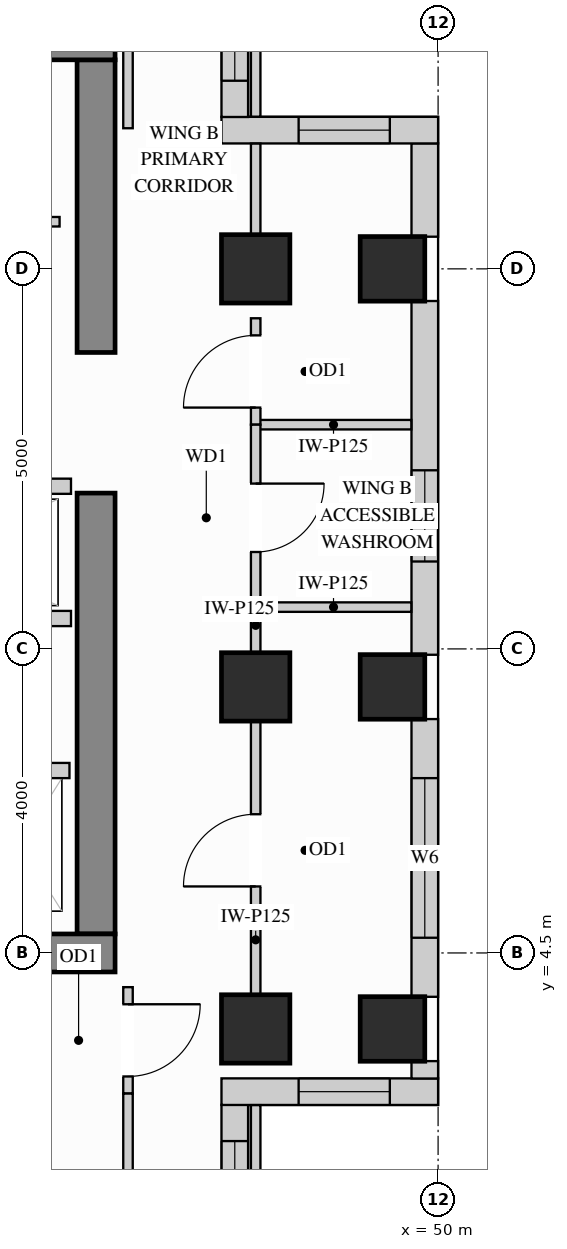
"""IFC4 building model, lengths in metres.
Left out: names, types, materials, properties, quantities, classifications, styles, units other than length and angle.
Written with IfcOpenShell. Run it as: python <this file> out.ifc"""

import sys

from ifc_helpers import new_model, si_unit, direction, frame, frame_2d, origin, origin_2d, place, context, subcontext, project, spatial, rectangle, extrude, source, transform, mapped, element, fill, save


model = new_model("IFC4")
c1 = context("Model", 3, precision=1e-05, world=origin(), true_north=direction((0.0, 1.0)))
c2 = subcontext(c1, "Body", "Model", "MODEL_VIEW")
j1 = project(units=[si_unit("LENGTHUNIT", "METRE"), si_unit("PLANEANGLEUNIT", "RADIAN")], contexts=[c1])
p1 = place(None, origin())
s1 = spatial("IfcSite", under=j1, at=p1, CompositionType="ELEMENT")
p2 = place(p1, origin())
s2 = spatial("IfcBuilding", under=s1, at=p2, CompositionType="ELEMENT")
p3 = place(p2, frame((0.0, 0.0, 241.2)))
s3 = spatial("IfcBuildingStorey", under=s2, at=p3, CompositionType="ELEMENT", Elevation=241.2)
m1 = source(origin(), c2, "Body", "SweptSolid", [
    extrude(rectangle(XDim=0.9, YDim=0.9, at=origin_2d()), origin(), (0.0, 0.0, 1.0), 3.4),
])
for number, where, z_axis, x_axis in (
    (1, (47.6, 13.5, 0.0), (0.0, 0.0, 1.0), (1.0, 0.0, 0.0)),
    (2, (47.6, 3.5, 0.0), (0.0, 0.0, 1.0), (1.0, 0.0, 0.0)),
    (3, (47.6, 8.0, 0.0), (0.0, 0.0, 1.0), (1.0, 0.0, 0.0)),
):
    element("IfcColumn", number, at=place(p3, frame(where, z_axis=z_axis, x_axis=x_axis)), inside=s3, PredefinedType="COLUMN", context=c2, shape_type="MappedRepresentation", body=[
        mapped(m1, transform((0.0, 0.0, 0.0), x_axis=(1.0, 0.0, 0.0), y_axis=(0.0, 1.0, 0.0), z_axis=(0.0, 0.0, 1.0))),
    ])
m2 = source(origin(), c2, "Body", "SweptSolid", [
    extrude(rectangle(XDim=0.85, YDim=0.85, at=origin_2d()), origin(), (0.0, 0.0, 1.0), 3.4),
])
for number, where, z_axis, x_axis in (
    (4, (49.4, 13.5, 0.0), (0.0, 0.0, 1.0), (1.0, 0.0, 0.0)),
    (5, (49.4, 3.5, 0.0), (0.0, 0.0, 1.0), (1.0, 0.0, 0.0)),
    (6, (49.4, 8.0, 0.0), (0.0, 0.0, 1.0), (1.0, 0.0, 0.0)),
):
    element("IfcColumn", number, at=place(p3, frame(where, z_axis=z_axis, x_axis=x_axis)), inside=s3, PredefinedType="COLUMN", context=c2, shape_type="MappedRepresentation", body=[
        mapped(m2, transform((0.0, 0.0, 0.0), x_axis=(1.0, 0.0, 0.0), y_axis=(0.0, 1.0, 0.0), z_axis=(0.0, 0.0, 1.0))),
    ])
m3 = source(origin(), c2, "Body", "SweptSolid", [
    extrude(rectangle(XDim=5.8, YDim=0.5, at=frame_2d((2.9, 0.0))), origin(), (0.0, 0.0, 1.0), 3.4),
])
p4 = place(p3, frame((45.5, 4.75, 0.0), z_axis=(0.0, 0.0, 1.0), x_axis=(0.0, 1.0, 0.0)))
e7 = element("IfcWall", 7, at=p4, inside=s3, PredefinedType="SHEAR", context=c2, shape_type="MappedRepresentation", body=[
    mapped(m3, transform((0.0, 0.0, 0.0), x_axis=(1.0, 0.0, 0.0), y_axis=(0.0, 1.0, 0.0), z_axis=(0.0, 0.0, 1.0))),
])
m4 = source(origin(), c2, "Body", "SweptSolid", [
    extrude(rectangle(XDim=3.85, YDim=0.5, at=frame_2d((1.925, 0.0))), origin(), (0.0, 0.0, 1.0), 3.4),
])
p5 = place(p3, frame((45.5, 12.4, 0.0), z_axis=(0.0, 0.0, 1.0), x_axis=(0.0, 1.0, 0.0)))
e8 = element("IfcWall", 8, at=p5, inside=s3, PredefinedType="SHEAR", context=c2, shape_type="MappedRepresentation", body=[
    mapped(m4, transform((0.0, 0.0, 0.0), x_axis=(1.0, 0.0, 0.0), y_axis=(0.0, 1.0, 0.0), z_axis=(0.0, 0.0, 1.0))),
])
m5 = source(origin(), c2, "Body", "SweptSolid", [
    extrude(rectangle(XDim=10.0, YDim=0.5, at=frame_2d((5.0, 0.0))), origin(), (0.0, 0.0, 1.0), 3.4),
])
for number, where, z_axis, x_axis in (
    (9, (35.75, 16.5, 0.0), (0.0, 0.0, 1.0), (1.0, 0.0, 0.0)),
    (10, (35.75, 4.5, 0.0), (0.0, 0.0, 1.0), (1.0, 0.0, 0.0)),
):
    element("IfcWall", number, at=place(p3, frame(where, z_axis=z_axis, x_axis=x_axis)), inside=s3, PredefinedType="SHEAR", context=c2, shape_type="MappedRepresentation", body=[
        mapped(m5, transform((0.0, 0.0, 0.0), x_axis=(1.0, 0.0, 0.0), y_axis=(0.0, 1.0, 0.0), z_axis=(0.0, 0.0, 1.0))),
    ])
p6 = place(p3, frame((47.325, 0.348, 0.0), z_axis=(0.0, 0.0, 1.0), x_axis=(0.0, 1.0, 0.0)))
e11 = element("IfcWall", 11, at=p6, inside=s3, PredefinedType="SOLIDWALL", context=c2, shape_type="SweptSolid", body=[
    extrude(rectangle(XDim=2.154, YDim=0.35, at=frame_2d((1.077, 0.0))), origin(), (0.0, 0.0, 1.0), 3.385),
])
p7 = place(p6, frame((0.477, 0.0, 0.78)))
e12 = element("IfcOpeningElement", 12, at=p7, cuts=e11, PredefinedType="OPENING", context=c2, shape_type="SweptSolid", body=[
    extrude(rectangle(XDim=1.2, YDim=2.25, at=frame_2d((0.6, 1.125))), frame((0.0, 0.185, 0.0), z_axis=(0.0, -1.0, 0.0), x_axis=(1.0, 0.0, 0.0)), (0.0, 0.0, 1.0), 0.37),
])
p8 = place(p3, frame((47.15, 2.675, 0.0), z_axis=(0.0, 0.0, 1.0), x_axis=(1.0, 0.0, 0.0)))
e13 = element("IfcWall", 13, at=p8, inside=s3, PredefinedType="SOLIDWALL", context=c2, shape_type="SweptSolid", body=[
    extrude(rectangle(XDim=2.85, YDim=0.35, at=frame_2d((1.425, 0.0))), origin(), (0.0, 0.0, 1.0), 3.385),
])
p9 = place(p8, frame((1.015, 0.0, 0.78)))
e14 = element("IfcOpeningElement", 14, at=p9, cuts=e13, PredefinedType="OPENING", context=c2, shape_type="SweptSolid", body=[
    extrude(rectangle(XDim=1.2, YDim=2.25, at=frame_2d((0.6, 1.125))), frame((0.0, 0.185, 0.0), z_axis=(0.0, -1.0, 0.0), x_axis=(1.0, 0.0, 0.0)), (0.0, 0.0, 1.0), 0.37),
])
m6 = source(origin(), c2, "Body", "SweptSolid", [
    extrude(rectangle(XDim=0.229, YDim=0.35, at=frame_2d((0.115, 0.0))), origin(), (0.0, 0.0, 1.0), 3.385),
])
p10 = place(p3, frame((49.825, 2.848, 0.0), z_axis=(0.0, 0.0, 1.0), x_axis=(0.0, 1.0, 0.0)))
e15 = element("IfcWall", 15, at=p10, inside=s3, PredefinedType="SOLIDWALL", context=c2, shape_type="MappedRepresentation", body=[
    mapped(m6, transform((0.0, 0.0, 0.0), x_axis=(1.0, 0.0, 0.0), y_axis=(0.0, 1.0, 0.0), z_axis=(0.0, 0.0, 1.0))),
])
p11 = place(p3, frame((49.825, 3.923, 0.0), z_axis=(0.0, 0.0, 1.0), x_axis=(0.0, 1.0, 0.0)))
e16 = element("IfcWall", 16, at=p11, inside=s3, PredefinedType="SOLIDWALL", context=c2, shape_type="SweptSolid", body=[
    extrude(rectangle(XDim=3.654, YDim=0.35, at=frame_2d((1.827, 0.0))), origin(), (0.0, 0.0, 1.0), 3.385),
])
p12 = place(p11, frame((0.777, 0.0, 0.78)))
e17 = element("IfcOpeningElement", 17, at=p12, cuts=e16, PredefinedType="OPENING", context=c2, shape_type="SweptSolid", body=[
    extrude(rectangle(XDim=2.1, YDim=2.25, at=frame_2d((1.05, 1.125))), frame((0.0, 0.185, 0.0), z_axis=(0.0, -1.0, 0.0), x_axis=(1.0, 0.0, 0.0)), (0.0, 0.0, 1.0), 0.37),
])
p13 = place(p3, frame((49.825, 8.423, 0.0), z_axis=(0.0, 0.0, 1.0), x_axis=(0.0, 1.0, 0.0)))
e18 = element("IfcWall", 18, at=p13, inside=s3, PredefinedType="SOLIDWALL", context=c2, shape_type="SweptSolid", body=[
    extrude(rectangle(XDim=4.654, YDim=0.35, at=frame_2d((2.327, 0.0))), origin(), (0.0, 0.0, 1.0), 3.385),
])
p14 = place(p13, frame((1.227, 0.0, 0.78)))
e19 = element("IfcOpeningElement", 19, at=p14, cuts=e18, PredefinedType="OPENING", context=c2, shape_type="SweptSolid", body=[
    extrude(rectangle(XDim=1.2, YDim=2.25, at=frame_2d((0.6, 1.125))), frame((0.0, 0.185, 0.0), z_axis=(0.0, -1.0, 0.0), x_axis=(1.0, 0.0, 0.0)), (0.0, 0.0, 1.0), 0.37),
])
m7 = source(origin(), c2, "Body", "SweptSolid", [
    extrude(rectangle(XDim=1.229, YDim=0.35, at=frame_2d((0.615, 0.0))), origin(), (0.0, 0.0, 1.0), 3.385),
])
p15 = place(p3, frame((49.825, 13.923, 0.0), z_axis=(0.0, 0.0, 1.0), x_axis=(0.0, 1.0, 0.0)))
e20 = element("IfcWall", 20, at=p15, inside=s3, PredefinedType="SOLIDWALL", context=c2, shape_type="MappedRepresentation", body=[
    mapped(m7, transform((0.0, 0.0, 0.0), x_axis=(1.0, 0.0, 0.0), y_axis=(0.0, 1.0, 0.0), z_axis=(0.0, 0.0, 1.0))),
])
p16 = place(p3, frame((50.0, 15.325, 0.0), z_axis=(0.0, 0.0, 1.0), x_axis=(-1.0, 0.0, 0.0)))
e21 = element("IfcWall", 21, at=p16, inside=s3, PredefinedType="SOLIDWALL", context=c2, shape_type="SweptSolid", body=[
    extrude(rectangle(XDim=2.85, YDim=0.35, at=frame_2d((1.425, 0.0))), origin(), (0.0, 0.0, 1.0), 3.385),
])
p17 = place(p16, frame((0.635, 0.0, 0.78)))
e22 = element("IfcOpeningElement", 22, at=p17, cuts=e21, PredefinedType="OPENING", context=c2, shape_type="SweptSolid", body=[
    extrude(rectangle(XDim=1.2, YDim=2.25, at=frame_2d((0.6, 1.125))), frame((0.0, 0.185, 0.0), z_axis=(0.0, -1.0, 0.0), x_axis=(1.0, 0.0, 0.0)), (0.0, 0.0, 1.0), 0.37),
])
p18 = place(p3, frame((47.325, 15.498, 0.0), z_axis=(0.0, 0.0, 1.0), x_axis=(0.0, 1.0, 0.0)))
e23 = element("IfcWall", 23, at=p18, inside=s3, PredefinedType="SOLIDWALL", context=c2, shape_type="SweptSolid", body=[
    extrude(rectangle(XDim=2.154, YDim=0.35, at=frame_2d((1.077, 0.0))), origin(), (0.0, 0.0, 1.0), 3.385),
])
p19 = place(p18, frame((0.477, 0.0, 0.78)))
e24 = element("IfcOpeningElement", 24, at=p19, cuts=e23, PredefinedType="OPENING", context=c2, shape_type="SweptSolid", body=[
    extrude(rectangle(XDim=1.2, YDim=2.25, at=frame_2d((0.6, 1.125))), frame((0.0, 0.185, 0.0), z_axis=(0.0, -1.0, 0.0), x_axis=(1.0, 0.0, 0.0)), (0.0, 0.0, 1.0), 0.37),
])
p20 = place(p3, frame((41.8, 14.12, 0.0), z_axis=(0.0, 0.0, 1.0), x_axis=(1.0, 0.0, 0.0)))
e25 = element("IfcWall", 25, at=p20, inside=s3, PredefinedType="PARTITIONING", context=c2, shape_type="SweptSolid", body=[
    extrude(rectangle(XDim=3.22, YDim=0.125, at=frame_2d((1.61, 0.0))), origin(), (0.0, 0.0, 1.0), 3.385),
])
p21 = place(p20, frame((1.135, 0.0, 0.0)))
e26 = element("IfcOpeningElement", 26, at=p21, cuts=e25, PredefinedType="OPENING", context=c2, shape_type="SweptSolid", body=[
    extrude(rectangle(XDim=0.85, YDim=2.1, at=frame_2d((0.425, 1.05))), frame((0.0, 0.073, 0.0), z_axis=(0.0, -1.0, 0.0), x_axis=(1.0, 0.0, 0.0)), (0.0, 0.0, 1.0), 0.145),
])
m8 = source(origin(), c2, "Body", "SweptSolid", [
    extrude(rectangle(XDim=2.048, YDim=0.125, at=frame_2d((1.024, 0.0))), origin(), (0.0, 0.0, 1.0), 3.385),
])
for number, where, z_axis, x_axis in (
    (27, (47.6, 11.45, 0.0), (0.0, 0.0, 1.0), (1.0, 0.0, 0.0)),
    (28, (47.6, 9.05, 0.0), (0.0, 0.0, 1.0), (1.0, 0.0, 0.0)),
):
    element("IfcWall", number, at=place(p3, frame(where, z_axis=z_axis, x_axis=x_axis)), inside=s3, PredefinedType="PARTITIONING", context=c2, shape_type="MappedRepresentation", body=[
        mapped(m8, transform((0.0, 0.0, 0.0), x_axis=(1.0, 0.0, 0.0), y_axis=(0.0, 1.0, 0.0), z_axis=(0.0, 0.0, 1.0))),
    ])
p22 = place(p3, frame((47.6, 3.95, 0.0), z_axis=(0.0, 0.0, 1.0), x_axis=(0.0, 1.0, 0.0)))
e29 = element("IfcWall", 29, at=p22, inside=s3, PredefinedType="PARTITIONING", context=c2, shape_type="SweptSolid", body=[
    extrude(rectangle(XDim=3.6, YDim=0.125, at=frame_2d((1.8, 0.0))), origin(), (0.0, 0.0, 1.0), 2.773),
])
p23 = place(p22, frame((1.425, 0.0, 0.0)))
e30 = element("IfcOpeningElement", 30, at=p23, cuts=e29, PredefinedType="OPENING", context=c2, shape_type="SweptSolid", body=[
    extrude(rectangle(XDim=0.95, YDim=2.15, at=frame_2d((0.475, 1.075))), frame((0.0, 0.073, 0.0), z_axis=(0.0, -1.0, 0.0), x_axis=(1.0, 0.0, 0.0)), (0.0, 0.0, 1.0), 0.145),
])
m9 = source(origin(), c2, "Body", "SweptSolid", [
    extrude(rectangle(XDim=0.6, YDim=0.125, at=frame_2d((0.3, 0.0))), origin(), (0.0, 0.0, 1.0), 2.773),
])
p24 = place(p3, frame((47.6, 8.45, 0.0), z_axis=(0.0, 0.0, 1.0), x_axis=(0.0, 1.0, 0.0)))
e31 = element("IfcWall", 31, at=p24, inside=s3, PredefinedType="PARTITIONING", context=c2, shape_type="MappedRepresentation", body=[
    mapped(m9, transform((0.0, 0.0, 0.0), x_axis=(1.0, 0.0, 0.0), y_axis=(0.0, 1.0, 0.0), z_axis=(0.0, 0.0, 1.0))),
])
m10 = source(origin(), c2, "Body", "SweptSolid", [
    extrude(rectangle(XDim=2.148, YDim=0.125, at=frame_2d((1.074, 0.0))), origin(), (0.0, 0.0, 1.0), 3.385),
])
p25 = place(p3, frame((47.6, 0.35, 0.0), z_axis=(0.0, 0.0, 1.0), x_axis=(0.0, 1.0, 0.0)))
e32 = element("IfcWall", 32, at=p25, inside=s3, PredefinedType="PARTITIONING", context=c2, shape_type="MappedRepresentation", body=[
    mapped(m10, transform((0.0, 0.0, 0.0), x_axis=(1.0, 0.0, 0.0), y_axis=(0.0, 1.0, 0.0), z_axis=(0.0, 0.0, 1.0))),
])
p26 = place(p3, frame((47.6, 11.45, 0.0), z_axis=(0.0, 0.0, 1.0), x_axis=(0.0, 1.0, 0.0)))
e33 = element("IfcWall", 33, at=p26, inside=s3, PredefinedType="PARTITIONING", context=c2, shape_type="SweptSolid", body=[
    extrude(rectangle(XDim=1.4, YDim=0.125, at=frame_2d((0.7, 0.0))), origin(), (0.0, 0.0, 1.0), 2.773),
])
p27 = place(p26, frame((0.225, 0.0, 0.0)))
e34 = element("IfcOpeningElement", 34, at=p27, cuts=e33, PredefinedType="OPENING", context=c2, shape_type="SweptSolid", body=[
    extrude(rectangle(XDim=0.95, YDim=2.15, at=frame_2d((0.475, 1.075))), frame((0.0, 0.073, 0.0), z_axis=(0.0, -1.0, 0.0), x_axis=(1.0, 0.0, 0.0)), (0.0, 0.0, 1.0), 0.145),
])
m11 = source(origin(), c2, "Body", "SweptSolid", [
    extrude(rectangle(XDim=1.198, YDim=0.125, at=frame_2d((0.599, 0.0))), origin(), (0.0, 0.0, 1.0), 3.385),
])
p28 = place(p3, frame((47.6, 13.95, 0.0), z_axis=(0.0, 0.0, 1.0), x_axis=(0.0, 1.0, 0.0)))
e35 = element("IfcWall", 35, at=p28, inside=s3, PredefinedType="PARTITIONING", context=c2, shape_type="MappedRepresentation", body=[
    mapped(m11, transform((0.0, 0.0, 0.0), x_axis=(1.0, 0.0, 0.0), y_axis=(0.0, 1.0, 0.0), z_axis=(0.0, 0.0, 1.0))),
])
p29 = place(p3, frame((47.6, 15.502, 0.0), z_axis=(0.0, 0.0, 1.0), x_axis=(0.0, 1.0, 0.0)))
e36 = element("IfcWall", 36, at=p29, inside=s3, PredefinedType="PARTITIONING", context=c2, shape_type="MappedRepresentation", body=[
    mapped(m10, transform((0.0, 0.0, 0.0), x_axis=(1.0, 0.0, 0.0), y_axis=(0.0, 1.0, 0.0), z_axis=(0.0, 0.0, 1.0))),
])
p30 = place(p3, frame((47.6, 9.05, 0.0), z_axis=(0.0, 0.0, 1.0), x_axis=(0.0, 1.0, 0.0)))
e37 = element("IfcWall", 37, at=p30, inside=s3, PredefinedType="PARTITIONING", context=c2, shape_type="SweptSolid", body=[
    extrude(rectangle(XDim=2.4, YDim=0.125, at=frame_2d((1.2, 0.0))), origin(), (0.0, 0.0, 1.0), 2.773),
])
p31 = place(p30, frame((0.725, 0.0, 0.0)))
e38 = element("IfcOpeningElement", 38, at=p31, cuts=e37, PredefinedType="OPENING", context=c2, shape_type="SweptSolid", body=[
    extrude(rectangle(XDim=0.9, YDim=2.15, at=frame_2d((0.45, 1.075))), frame((0.0, 0.073, 0.0), z_axis=(0.0, -1.0, 0.0), x_axis=(1.0, 0.0, 0.0)), (0.0, 0.0, 1.0), 0.145),
])
m12 = source(origin(), c2, "Body", "SweptSolid", [
    extrude(rectangle(XDim=2.298, YDim=0.125, at=frame_2d((1.149, 0.0))), origin(), (0.0, 0.0, 1.0), 3.385),
])
p32 = place(p3, frame((45.92, 15.35, 0.0), z_axis=(0.0, 0.0, 1.0), x_axis=(0.0, 1.0, 0.0)))
e39 = element("IfcWall", 39, at=p32, inside=s3, PredefinedType="PARTITIONING", context=c2, shape_type="MappedRepresentation", body=[
    mapped(m12, transform((0.0, 0.0, 0.0), x_axis=(1.0, 0.0, 0.0), y_axis=(0.0, 1.0, 0.0), z_axis=(0.0, 0.0, 1.0))),
])
p33 = place(p3, frame((45.92, 2.65, 0.0), z_axis=(0.0, 0.0, 1.0), x_axis=(0.0, 1.0, 0.0)))
e40 = element("IfcWall", 40, at=p33, inside=s3, PredefinedType="PARTITIONING", context=c2, shape_type="SweptSolid", body=[
    extrude(rectangle(XDim=1.4, YDim=0.125, at=frame_2d((0.7, 0.0))), origin(), (0.0, 0.0, 1.0), 3.385),
])
p34 = place(p33, frame((0.225, 0.0, 0.0)))
e41 = element("IfcOpeningElement", 41, at=p34, cuts=e40, PredefinedType="OPENING", context=c2, shape_type="SweptSolid", body=[
    extrude(rectangle(XDim=0.95, YDim=2.15, at=frame_2d((0.475, 1.075))), frame((0.0, 0.073, 0.0), z_axis=(0.0, -1.0, 0.0), x_axis=(1.0, 0.0, 0.0)), (0.0, 0.0, 1.0), 0.145),
])
p35 = place(p3, frame((45.92, 0.352, 0.0), z_axis=(0.0, 0.0, 1.0), x_axis=(0.0, 1.0, 0.0)))
e42 = element("IfcWall", 42, at=p35, inside=s3, PredefinedType="PARTITIONING", context=c2, shape_type="MappedRepresentation", body=[
    mapped(m12, transform((0.0, 0.0, 0.0), x_axis=(1.0, 0.0, 0.0), y_axis=(0.0, 1.0, 0.0), z_axis=(0.0, 0.0, 1.0))),
])
m13 = source(origin(), c2, "Body", "SweptSolid", [
    extrude(rectangle(XDim=1.3, YDim=0.2, at=frame_2d((0.65, 0.0))), origin(), (0.0, 0.0, 1.0), 3.385),
])
p36 = place(p3, frame((43.85, 6.9, 0.0), z_axis=(0.0, 0.0, 1.0), x_axis=(1.0, 0.0, 0.0)))
e43 = element("IfcWall", 43, at=p36, inside=s3, PredefinedType="PARTITIONING", context=c2, shape_type="MappedRepresentation", body=[
    mapped(m13, transform((0.0, 0.0, 0.0), x_axis=(1.0, 0.0, 0.0), y_axis=(0.0, 1.0, 0.0), z_axis=(0.0, 0.0, 1.0))),
])
m14 = source(origin(), c2, "Body", "SweptSolid", [
    extrude(rectangle(XDim=3.49, YDim=0.2, at=frame_2d((1.745, 0.0))), origin(), (0.0, 0.0, 1.0), 3.385),
])
for number, where, z_axis, x_axis in (
    (44, (41.68, 10.64, 0.0), (0.0, 0.0, 1.0), (1.0, 0.0, 0.0)),
    (45, (41.68, 8.9, 0.0), (0.0, 0.0, 1.0), (1.0, 0.0, 0.0)),
):
    element("IfcWall", number, at=place(p3, frame(where, z_axis=z_axis, x_axis=x_axis)), inside=s3, PredefinedType="PARTITIONING", context=c2, shape_type="MappedRepresentation", body=[
        mapped(m14, transform((0.0, 0.0, 0.0), x_axis=(1.0, 0.0, 0.0), y_axis=(0.0, 1.0, 0.0), z_axis=(0.0, 0.0, 1.0))),
    ])
m15 = source(origin(), c2, "Body", "SweptSolid", [
    extrude(rectangle(XDim=0.95, YDim=2.15, at=frame_2d((0.475, 1.075))), frame((0.0, 0.025, 0.0), z_axis=(0.0, -1.0, 0.0), x_axis=(1.0, 0.0, 0.0)), (0.0, 0.0, 1.0), 0.05),
])
p37 = place(p34, origin())
e46 = element("IfcDoor", 46, at=p37, inside=s3, OperationType="SINGLE_SWING_RIGHT", PredefinedType="DOOR", context=c2, shape_type="MappedRepresentation", body=[
    mapped(m15, transform((0.0, 0.0, 0.0), x_axis=(1.0, 0.0, 0.0), y_axis=(0.0, 1.0, 0.0), z_axis=(0.0, 0.0, 1.0))),
])
fill(e41, e46)
p38 = place(p23, origin())
e47 = element("IfcDoor", 47, at=p38, inside=s3, OperationType="SINGLE_SWING_LEFT", PredefinedType="DOOR", context=c2, shape_type="MappedRepresentation", body=[
    mapped(m15, transform((0.0, 0.0, 0.0), x_axis=(1.0, 0.0, 0.0), y_axis=(0.0, 1.0, 0.0), z_axis=(0.0, 0.0, 1.0))),
])
fill(e30, e47)
p39 = place(p27, origin())
e48 = element("IfcDoor", 48, at=p39, inside=s3, OperationType="SINGLE_SWING_LEFT", PredefinedType="DOOR", context=c2, shape_type="MappedRepresentation", body=[
    mapped(m15, transform((0.0, 0.0, 0.0), x_axis=(1.0, 0.0, 0.0), y_axis=(0.0, 1.0, 0.0), z_axis=(0.0, 0.0, 1.0))),
])
fill(e34, e48)
m16 = source(origin(), c2, "Body", "SweptSolid", [
    extrude(rectangle(XDim=0.9, YDim=2.15, at=frame_2d((0.45, 1.075))), frame((0.0, 0.025, 0.0), z_axis=(0.0, -1.0, 0.0), x_axis=(1.0, 0.0, 0.0)), (0.0, 0.0, 1.0), 0.05),
])
p40 = place(p31, origin())
e49 = element("IfcDoor", 49, at=p40, inside=s3, OperationType="SINGLE_SWING_RIGHT", PredefinedType="DOOR", context=c2, shape_type="MappedRepresentation", body=[
    mapped(m16, transform((0.0, 0.0, 0.0), x_axis=(1.0, 0.0, 0.0), y_axis=(0.0, 1.0, 0.0), z_axis=(0.0, 0.0, 1.0))),
])
fill(e38, e49)
m17 = source(origin(), c2, "Body", "SweptSolid", [
    extrude(rectangle(XDim=1.2, YDim=2.25, at=frame_2d((0.6, 1.125))), frame((0.0, 0.03, 0.0), z_axis=(0.0, -1.0, 0.0), x_axis=(1.0, 0.0, 0.0)), (0.0, 0.0, 1.0), 0.06),
])
p41 = place(p7, origin())
e50 = element("IfcWindow", 50, at=p41, inside=s3, PartitioningType="SINGLE_PANEL", PredefinedType="WINDOW", context=c2, shape_type="MappedRepresentation", body=[
    mapped(m17, transform((0.0, 0.0, 0.0), x_axis=(1.0, 0.0, 0.0), y_axis=(0.0, 1.0, 0.0), z_axis=(0.0, 0.0, 1.0))),
])
fill(e12, e50)
p42 = place(p9, origin())
e51 = element("IfcWindow", 51, at=p42, inside=s3, PartitioningType="SINGLE_PANEL", PredefinedType="WINDOW", context=c2, shape_type="MappedRepresentation", body=[
    mapped(m17, transform((0.0, 0.0, 0.0), x_axis=(1.0, 0.0, 0.0), y_axis=(0.0, 1.0, 0.0), z_axis=(0.0, 0.0, 1.0))),
])
fill(e14, e51)
p43 = place(p14, origin())
e52 = element("IfcWindow", 52, at=p43, inside=s3, PartitioningType="SINGLE_PANEL", PredefinedType="WINDOW", context=c2, shape_type="MappedRepresentation", body=[
    mapped(m17, transform((0.0, 0.0, 0.0), x_axis=(1.0, 0.0, 0.0), y_axis=(0.0, 1.0, 0.0), z_axis=(0.0, 0.0, 1.0))),
])
fill(e19, e52)
p44 = place(p17, origin())
e53 = element("IfcWindow", 53, at=p44, inside=s3, PartitioningType="SINGLE_PANEL", PredefinedType="WINDOW", context=c2, shape_type="MappedRepresentation", body=[
    mapped(m17, transform((0.0, 0.0, 0.0), x_axis=(1.0, 0.0, 0.0), y_axis=(0.0, 1.0, 0.0), z_axis=(0.0, 0.0, 1.0))),
])
fill(e22, e53)
p45 = place(p19, origin())
e54 = element("IfcWindow", 54, at=p45, inside=s3, PartitioningType="SINGLE_PANEL", PredefinedType="WINDOW", context=c2, shape_type="MappedRepresentation", body=[
    mapped(m17, transform((0.0, 0.0, 0.0), x_axis=(1.0, 0.0, 0.0), y_axis=(0.0, 1.0, 0.0), z_axis=(0.0, 0.0, 1.0))),
])
fill(e24, e54)
m18 = source(origin(), c2, "Body", "SweptSolid", [
    extrude(rectangle(XDim=2.1, YDim=2.25, at=frame_2d((1.05, 1.125))), frame((0.0, 0.03, 0.0), z_axis=(0.0, -1.0, 0.0), x_axis=(1.0, 0.0, 0.0)), (0.0, 0.0, 1.0), 0.06),
])
p46 = place(p12, origin())
e55 = element("IfcWindow", 55, at=p46, inside=s3, PartitioningType="SINGLE_PANEL", PredefinedType="WINDOW", context=c2, shape_type="MappedRepresentation", body=[
    mapped(m18, transform((0.0, 0.0, 0.0), x_axis=(1.0, 0.0, 0.0), y_axis=(0.0, 1.0, 0.0), z_axis=(0.0, 0.0, 1.0))),
])
fill(e17, e55)
save(model, sys.argv[1])
